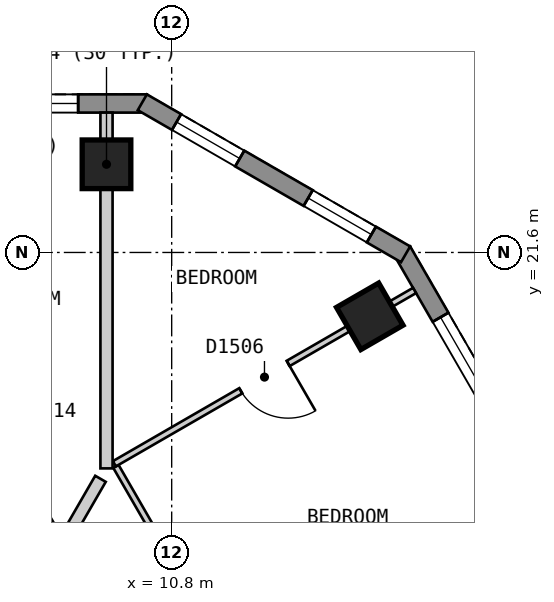
"""IFC4 building model, lengths in metres.
Left out: names, types, materials, properties, quantities, classifications, styles, units other than length and angle.
Written with IfcOpenShell. Run it as: python <this file> out.ifc"""

import sys

from ifc_helpers import new_model, si_unit, direction, frame, frame_2d, origin, origin_2d, place, context, subcontext, project, spatial, polyline, rectangle, outline, extrude, element, fill, save


model = new_model("IFC4")
c1 = context("Model", 3, precision=1e-05, world=origin(), true_north=direction((0.0, 1.0)))
c2 = subcontext(c1, "Body", "Model", "MODEL_VIEW")
j1 = project(units=[si_unit("LENGTHUNIT", "METRE"), si_unit("PLANEANGLEUNIT", "RADIAN")], contexts=[c1])
p1 = place(None, origin())
s1 = spatial("IfcSite", under=j1, at=p1, CompositionType="ELEMENT")
p2 = place(p1, origin())
s2 = spatial("IfcBuilding", under=s1, at=p2, CompositionType="ELEMENT")
p3 = place(p2, frame((0.0, 0.0, 190.2)))
s3 = spatial("IfcBuildingStorey", under=s2, at=p3, CompositionType="ELEMENT", Elevation=190.2)
for number, where, z_axis, x_axis in (
    (1, (9.728, 23.05, 0.0), (0.0, 0.0, 1.0), (-1.0, 0.0, 0.0)),
    (2, (14.058, 20.55, 0.0), (0.0, 0.0, 1.0), (-0.5, 0.866, 0.0)),
):
    element("IfcColumn", number, at=place(p3, frame(where, z_axis=z_axis, x_axis=x_axis)), inside=s3, PredefinedType="COLUMN", context=c2, shape_type="SweptSolid", body=[
        extrude(rectangle(XDim=0.8, YDim=0.8, at=origin_2d()), origin(), (0.0, 0.0, 1.0), 3.0),
    ])
p4 = place(p3, frame((10.392, 24.05, 0.0), z_axis=(0.0, 0.0, 1.0), x_axis=(-1.0, 0.0, 0.0)))
e3 = element("IfcWall", 3, at=p4, inside=s3, PredefinedType="SOLIDWALL", context=c2, shape_type="SweptSolid", body=[
    extrude(outline(polyline([(0.0, -0.15), (20.784, -0.15), (20.704, 0.15), (0.08, 0.15), (0.0, -0.15)])), origin(), (0.0, 0.0, 1.0), 2.7),
])
p5 = place(p4, frame((1.13, 0.0, 0.15)))
e4 = element("IfcOpeningElement", 4, at=p5, cuts=e3, PredefinedType="OPENING", context=c2, shape_type="SweptSolid", body=[
    extrude(rectangle(XDim=1.5, YDim=2.1, at=frame_2d((0.75, 1.05))), frame((0.0, 0.16, 0.0), z_axis=(0.0, -1.0, 0.0), x_axis=(1.0, 0.0, 0.0)), (0.0, 0.0, 1.0), 0.32),
])
p6 = place(p4, frame((3.562, 0.0, 0.15)))
e5 = element("IfcOpeningElement", 5, at=p6, cuts=e3, PredefinedType="OPENING", context=c2, shape_type="SweptSolid", body=[
    extrude(rectangle(XDim=1.5, YDim=2.1, at=frame_2d((0.75, 1.05))), frame((0.0, 0.16, 0.0), z_axis=(0.0, -1.0, 0.0), x_axis=(1.0, 0.0, 0.0)), (0.0, 0.0, 1.0), 0.32),
])
p7 = place(p4, frame((5.994, 0.0, 0.15)))
e6 = element("IfcOpeningElement", 6, at=p7, cuts=e3, PredefinedType="OPENING", context=c2, shape_type="SweptSolid", body=[
    extrude(rectangle(XDim=1.5, YDim=2.1, at=frame_2d((0.75, 1.05))), frame((0.0, 0.16, 0.0), z_axis=(0.0, -1.0, 0.0), x_axis=(1.0, 0.0, 0.0)), (0.0, 0.0, 1.0), 0.32),
])
p8 = place(p4, frame((8.426, 0.0, 0.15)))
e7 = element("IfcOpeningElement", 7, at=p8, cuts=e3, PredefinedType="OPENING", context=c2, shape_type="SweptSolid", body=[
    extrude(rectangle(XDim=1.5, YDim=2.1, at=frame_2d((0.75, 1.05))), frame((0.0, 0.16, 0.0), z_axis=(0.0, -1.0, 0.0), x_axis=(1.0, 0.0, 0.0)), (0.0, 0.0, 1.0), 0.32),
])
p9 = place(p4, frame((10.858, 0.0, 0.15)))
e8 = element("IfcOpeningElement", 8, at=p9, cuts=e3, PredefinedType="OPENING", context=c2, shape_type="SweptSolid", body=[
    extrude(rectangle(XDim=1.5, YDim=2.1, at=frame_2d((0.75, 1.05))), frame((0.0, 0.16, 0.0), z_axis=(0.0, -1.0, 0.0), x_axis=(1.0, 0.0, 0.0)), (0.0, 0.0, 1.0), 0.32),
])
p10 = place(p4, frame((13.29, 0.0, 0.15)))
e9 = element("IfcOpeningElement", 9, at=p10, cuts=e3, PredefinedType="OPENING", context=c2, shape_type="SweptSolid", body=[
    extrude(rectangle(XDim=1.5, YDim=2.1, at=frame_2d((0.75, 1.05))), frame((0.0, 0.16, 0.0), z_axis=(0.0, -1.0, 0.0), x_axis=(1.0, 0.0, 0.0)), (0.0, 0.0, 1.0), 0.32),
])
p11 = place(p4, frame((15.722, 0.0, 0.15)))
e10 = element("IfcOpeningElement", 10, at=p11, cuts=e3, PredefinedType="OPENING", context=c2, shape_type="SweptSolid", body=[
    extrude(rectangle(XDim=1.5, YDim=2.1, at=frame_2d((0.75, 1.05))), frame((0.0, 0.16, 0.0), z_axis=(0.0, -1.0, 0.0), x_axis=(1.0, 0.0, 0.0)), (0.0, 0.0, 1.0), 0.32),
])
p12 = place(p4, frame((18.154, 0.0, 0.15)))
e11 = element("IfcOpeningElement", 11, at=p12, cuts=e3, PredefinedType="OPENING", context=c2, shape_type="SweptSolid", body=[
    extrude(rectangle(XDim=1.5, YDim=2.1, at=frame_2d((0.75, 1.05))), frame((0.0, 0.16, 0.0), z_axis=(0.0, -1.0, 0.0), x_axis=(1.0, 0.0, 0.0)), (0.0, 0.0, 1.0), 0.32),
])
p13 = place(p3, frame((26.024, 1.825, 0.0), z_axis=(0.0, 0.0, 1.0), x_axis=(-0.500010537973, 0.866019319597, 0.0)))
e12 = element("IfcWall", 12, at=p13, inside=s3, PredefinedType="SOLIDWALL", context=c2, shape_type="SweptSolid", body=[
    extrude(outline(polyline([(0.0, -0.15), (22.863, -0.15), (22.783, 0.15), (0.08, 0.15), (0.0, -0.15)])), origin(), (0.0, 0.0, 1.0), 2.7),
])
p14 = place(p13, frame((1.259, 0.0, 0.15)))
e13 = element("IfcOpeningElement", 13, at=p14, cuts=e12, PredefinedType="OPENING", context=c2, shape_type="SweptSolid", body=[
    extrude(rectangle(XDim=1.5, YDim=2.1, at=frame_2d((0.75, 1.05))), frame((0.0, 0.16, 0.0), z_axis=(0.0, -1.0, 0.0), x_axis=(1.0, 0.0, 0.0)), (0.0, 0.0, 1.0), 0.32),
])
p15 = place(p13, frame((3.952, 0.0, 0.15)))
e14 = element("IfcOpeningElement", 14, at=p15, cuts=e12, PredefinedType="OPENING", context=c2, shape_type="SweptSolid", body=[
    extrude(rectangle(XDim=1.5, YDim=2.1, at=frame_2d((0.75, 1.05))), frame((0.0, 0.16, 0.0), z_axis=(0.0, -1.0, 0.0), x_axis=(1.0, 0.0, 0.0)), (0.0, 0.0, 1.0), 0.32),
])
p16 = place(p13, frame((6.644, 0.0, 0.15)))
e15 = element("IfcOpeningElement", 15, at=p16, cuts=e12, PredefinedType="OPENING", context=c2, shape_type="SweptSolid", body=[
    extrude(rectangle(XDim=1.5, YDim=2.1, at=frame_2d((0.75, 1.05))), frame((0.0, 0.16, 0.0), z_axis=(0.0, -1.0, 0.0), x_axis=(1.0, 0.0, 0.0)), (0.0, 0.0, 1.0), 0.32),
])
p17 = place(p13, frame((9.335, 0.0, 0.15)))
e16 = element("IfcOpeningElement", 16, at=p17, cuts=e12, PredefinedType="OPENING", context=c2, shape_type="SweptSolid", body=[
    extrude(rectangle(XDim=1.5, YDim=2.1, at=frame_2d((0.75, 1.05))), frame((0.0, 0.16, 0.0), z_axis=(0.0, -1.0, 0.0), x_axis=(1.0, 0.0, 0.0)), (0.0, 0.0, 1.0), 0.32),
])
p18 = place(p13, frame((12.028, 0.0, 0.15)))
e17 = element("IfcOpeningElement", 17, at=p18, cuts=e12, PredefinedType="OPENING", context=c2, shape_type="SweptSolid", body=[
    extrude(rectangle(XDim=1.5, YDim=2.1, at=frame_2d((0.75, 1.05))), frame((0.0, 0.16, 0.0), z_axis=(0.0, -1.0, 0.0), x_axis=(1.0, 0.0, 0.0)), (0.0, 0.0, 1.0), 0.32),
])
p19 = place(p13, frame((14.72, 0.0, 0.15)))
e18 = element("IfcOpeningElement", 18, at=p19, cuts=e12, PredefinedType="OPENING", context=c2, shape_type="SweptSolid", body=[
    extrude(rectangle(XDim=1.5, YDim=2.1, at=frame_2d((0.75, 1.05))), frame((0.0, 0.16, 0.0), z_axis=(0.0, -1.0, 0.0), x_axis=(1.0, 0.0, 0.0)), (0.0, 0.0, 1.0), 0.32),
])
p20 = place(p13, frame((17.411, 0.0, 0.15)))
e19 = element("IfcOpeningElement", 19, at=p20, cuts=e12, PredefinedType="OPENING", context=c2, shape_type="SweptSolid", body=[
    extrude(rectangle(XDim=1.5, YDim=2.1, at=frame_2d((0.75, 1.05))), frame((0.0, 0.16, 0.0), z_axis=(0.0, -1.0, 0.0), x_axis=(1.0, 0.0, 0.0)), (0.0, 0.0, 1.0), 0.32),
])
p21 = place(p13, frame((20.104, 0.0, 0.15)))
e20 = element("IfcOpeningElement", 20, at=p21, cuts=e12, PredefinedType="OPENING", context=c2, shape_type="SweptSolid", body=[
    extrude(rectangle(XDim=1.5, YDim=2.1, at=frame_2d((0.75, 1.05))), frame((0.0, 0.16, 0.0), z_axis=(0.0, -1.0, 0.0), x_axis=(1.0, 0.0, 0.0)), (0.0, 0.0, 1.0), 0.32),
])
p22 = place(p3, frame((14.647, 21.57, 0.0), z_axis=(0.0, 0.0, 1.0), x_axis=(-0.866022959057, 0.500004234368, 0.0)))
e21 = element("IfcWall", 21, at=p22, inside=s3, PredefinedType="SOLIDWALL", context=c2, shape_type="SweptSolid", body=[
    extrude(outline(polyline([(0.0, -0.15), (5.0, -0.15), (4.92, 0.15), (0.08, 0.15), (0.0, -0.15)])), origin(), (0.0, 0.0, 1.0), 2.7),
])
p23 = place(p22, frame((0.65, 0.0, 0.15)))
e22 = element("IfcOpeningElement", 22, at=p23, cuts=e21, PredefinedType="OPENING", context=c2, shape_type="SweptSolid", body=[
    extrude(rectangle(XDim=1.2, YDim=2.1, at=frame_2d((0.6, 1.05))), frame((0.0, 0.16, 0.0), z_axis=(0.0, -1.0, 0.0), x_axis=(1.0, 0.0, 0.0)), (0.0, 0.0, 1.0), 0.32),
])
p24 = place(p22, frame((3.15, 0.0, 0.15)))
e23 = element("IfcOpeningElement", 23, at=p24, cuts=e21, PredefinedType="OPENING", context=c2, shape_type="SweptSolid", body=[
    extrude(rectangle(XDim=1.2, YDim=2.1, at=frame_2d((0.6, 1.05))), frame((0.0, 0.16, 0.0), z_axis=(0.0, -1.0, 0.0), x_axis=(1.0, 0.0, 0.0)), (0.0, 0.0, 1.0), 0.32),
])
p25 = place(p3, frame((5.485, 17.3, 0.0), z_axis=(0.0, 0.0, 1.0), x_axis=(0.499998905622, -0.866026035623, 0.0)))
e24 = element("IfcWall", 24, at=p25, inside=s3, PredefinedType="PARTITIONING", context=c2, shape_type="SweptSolid", body=[
    extrude(rectangle(XDim=10.524, YDim=0.2, at=frame_2d((5.262, 0.0))), origin(), (0.0, 0.0, 1.0), 2.7),
])
p26 = place(p25, frame((8.974, 0.0, 0.0)))
e25 = element("IfcOpeningElement", 25, at=p26, cuts=e24, PredefinedType="OPENING", context=c2, shape_type="SweptSolid", body=[
    extrude(rectangle(XDim=1.0, YDim=2.1, at=frame_2d((0.5, 1.05))), frame((0.0, 0.11, 0.0), z_axis=(0.0, -1.0, 0.0), x_axis=(1.0, 0.0, 0.0)), (0.0, 0.0, 1.0), 0.22),
])
p27 = place(p3, frame((7.073, 20.15, 0.0), z_axis=(0.0, 0.0, 1.0), x_axis=(0.499917691695, -0.866072919292, 0.0)))
e26 = element("IfcWall", 26, at=p27, inside=s3, PredefinedType="PARTITIONING", context=c2, shape_type="SweptSolid", body=[
    extrude(rectangle(XDim=3.753, YDim=0.1, at=frame_2d((1.876, 0.0))), origin(), (0.0, 0.0, 1.0), 2.7),
])
p28 = place(p27, frame((0.96, 0.0, 0.0)))
e27 = element("IfcOpeningElement", 27, at=p28, cuts=e26, PredefinedType="OPENING", context=c2, shape_type="SweptSolid", body=[
    extrude(rectangle(XDim=0.8, YDim=2.1, at=frame_2d((0.4, 1.05))), frame((0.0, 0.06, 0.0), z_axis=(0.0, -1.0, 0.0), x_axis=(1.0, 0.0, 0.0)), (0.0, 0.0, 1.0), 0.12),
])
p29 = place(p3, frame((9.883, 18.082, 0.0), z_axis=(0.0, 0.0, 1.0), x_axis=(0.500004428835, -0.86602284678, 0.0)))
e28 = element("IfcWall", 28, at=p29, inside=s3, PredefinedType="PARTITIONING", context=c2, shape_type="SweptSolid", body=[
    extrude(rectangle(XDim=10.618, YDim=0.1, at=frame_2d((5.309, 0.0))), origin(), (0.0, 0.0, 1.0), 2.7),
])
p30 = place(p29, frame((7.657, 0.0, 0.0)))
e29 = element("IfcOpeningElement", 29, at=p30, cuts=e28, PredefinedType="OPENING", context=c2, shape_type="SweptSolid", body=[
    extrude(rectangle(XDim=0.9, YDim=2.1, at=frame_2d((0.45, 1.05))), frame((0.0, 0.06, 0.0), z_axis=(0.0, -1.0, 0.0), x_axis=(1.0, 0.0, 0.0)), (0.0, 0.0, 1.0), 0.12),
])
p31 = place(p29, frame((2.242, 0.0, 0.0)))
e30 = element("IfcOpeningElement", 30, at=p31, cuts=e28, PredefinedType="OPENING", context=c2, shape_type="SweptSolid", body=[
    extrude(rectangle(XDim=0.8, YDim=2.1, at=frame_2d((0.4, 1.05))), frame((0.0, 0.06, 0.0), z_axis=(0.0, -1.0, 0.0), x_axis=(1.0, 0.0, 0.0)), (0.0, 0.0, 1.0), 0.12),
])
p32 = place(p3, frame((9.858, 18.125, 0.0), z_axis=(0.0, 0.0, 1.0), x_axis=(0.866004402611, 0.500036373335, 0.0)))
e31 = element("IfcWall", 31, at=p32, inside=s3, PredefinedType="PARTITIONING", context=c2, shape_type="SweptSolid", body=[
    extrude(rectangle(XDim=5.7, YDim=0.1, at=frame_2d((2.85, 0.0))), origin(), (0.0, 0.0, 1.0), 2.7),
])
p33 = place(p32, frame((2.4, 0.0, 0.0)))
e32 = element("IfcOpeningElement", 32, at=p33, cuts=e31, PredefinedType="OPENING", context=c2, shape_type="SweptSolid", body=[
    extrude(rectangle(XDim=0.9, YDim=2.1, at=frame_2d((0.45, 1.05))), frame((0.0, 0.06, 0.0), z_axis=(0.0, -1.0, 0.0), x_axis=(1.0, 0.0, 0.0)), (0.0, 0.0, 1.0), 0.12),
])
p34 = place(p3, frame((7.448, 14.1, 0.0), z_axis=(0.0, 0.0, 1.0), x_axis=(0.499961462843, 0.866047652079, 0.0)))
e33 = element("IfcWall", 33, at=p34, inside=s3, PredefinedType="PARTITIONING", context=c2, shape_type="SweptSolid", body=[
    extrude(rectangle(XDim=4.362, YDim=0.2, at=frame_2d((2.181, 0.0))), origin(), (0.0, 0.0, 1.0), 2.7),
])
p35 = place(p3, frame((9.728, 18.049, 0.0), z_axis=(0.0, 0.0, 1.0), x_axis=(0.0, 1.0, 0.0)))
e34 = element("IfcWall", 34, at=p35, inside=s3, PredefinedType="PARTITIONING", context=c2, shape_type="SweptSolid", body=[
    extrude(rectangle(XDim=5.851, YDim=0.2, at=frame_2d((2.925, 0.0))), origin(), (0.0, 0.0, 1.0), 2.7),
])
p36 = place(p5, origin())
e35 = element("IfcWindow", 35, at=p36, inside=s3, PartitioningType="SINGLE_PANEL", PredefinedType="WINDOW", context=c2, shape_type="SweptSolid", body=[
    extrude(rectangle(XDim=1.5, YDim=2.1, at=frame_2d((0.75, 1.05))), frame((0.0, 0.03, 0.0), z_axis=(0.0, -1.0, 0.0), x_axis=(1.0, 0.0, 0.0)), (0.0, 0.0, 1.0), 0.06),
])
fill(e4, e35)
p37 = place(p21, origin())
e36 = element("IfcWindow", 36, at=p37, inside=s3, PartitioningType="SINGLE_PANEL", PredefinedType="WINDOW", context=c2, shape_type="SweptSolid", body=[
    extrude(rectangle(XDim=1.5, YDim=2.1, at=frame_2d((0.75, 1.05))), frame((0.0, 0.03, 0.0), z_axis=(0.0, -1.0, 0.0), x_axis=(1.0, 0.0, 0.0)), (0.0, 0.0, 1.0), 0.06),
])
fill(e20, e36)
p38 = place(p23, origin())
e37 = element("IfcWindow", 37, at=p38, inside=s3, PartitioningType="SINGLE_PANEL", PredefinedType="WINDOW", context=c2, shape_type="SweptSolid", body=[
    extrude(rectangle(XDim=1.2, YDim=2.1, at=frame_2d((0.6, 1.05))), frame((0.0, 0.03, 0.0), z_axis=(0.0, -1.0, 0.0), x_axis=(1.0, 0.0, 0.0)), (0.0, 0.0, 1.0), 0.06),
])
fill(e22, e37)
p39 = place(p24, origin())
e38 = element("IfcWindow", 38, at=p39, inside=s3, PartitioningType="SINGLE_PANEL", PredefinedType="WINDOW", context=c2, shape_type="SweptSolid", body=[
    extrude(rectangle(XDim=1.2, YDim=2.1, at=frame_2d((0.6, 1.05))), frame((0.0, 0.03, 0.0), z_axis=(0.0, -1.0, 0.0), x_axis=(1.0, 0.0, 0.0)), (0.0, 0.0, 1.0), 0.06),
])
fill(e23, e38)
p40 = place(p33, origin())
e39 = element("IfcDoor", 39, at=p40, inside=s3, OperationType="SINGLE_SWING_RIGHT", PredefinedType="DOOR", context=c2, shape_type="SweptSolid", body=[
    extrude(rectangle(XDim=0.9, YDim=2.1, at=frame_2d((0.45, 1.05))), frame((0.0, 0.025, 0.0), z_axis=(0.0, -1.0, 0.0), x_axis=(1.0, 0.0, 0.0)), (0.0, 0.0, 1.0), 0.05),
])
fill(e32, e39)
save(model, sys.argv[1])
